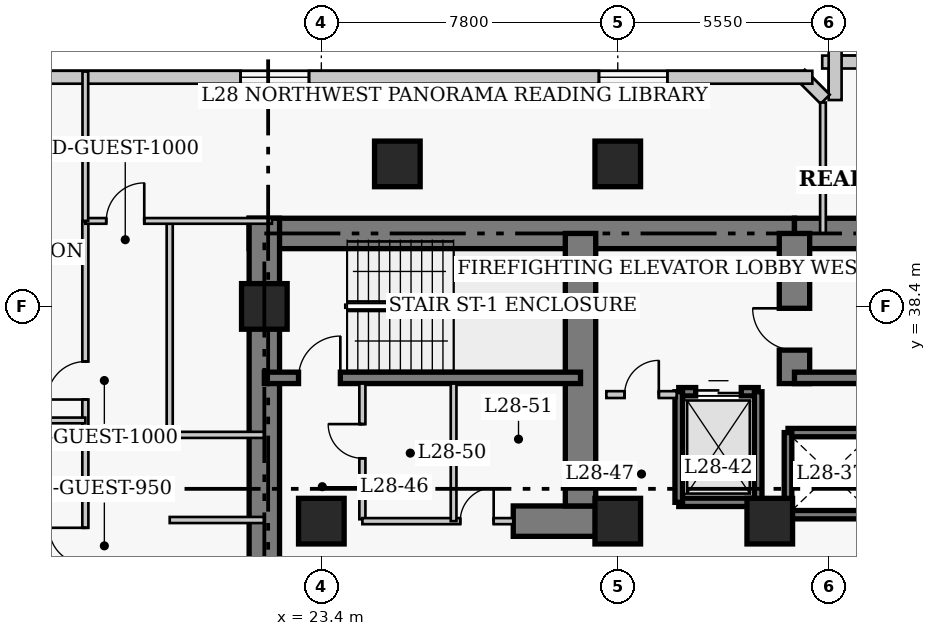
"""IFC4 building model, lengths in metres.
Left out: names, types, materials, properties, quantities, classifications, styles, units other than length and angle.
Written with IfcOpenShell. Run it as: python <this file> out.ifc"""

import sys

from ifc_helpers import new_model, si_unit, direction, frame, frame_2d, origin, origin_2d, place, context, subcontext, project, spatial, rectangle, extrude, element, fill, save


model = new_model("IFC4")
c1 = context("Model", 3, precision=1e-05, world=origin(), true_north=direction((0.0, 1.0)))
c2 = subcontext(c1, "Body", "Model", "MODEL_VIEW")
j1 = project(units=[si_unit("LENGTHUNIT", "METRE"), si_unit("PLANEANGLEUNIT", "RADIAN")], contexts=[c1])
p1 = place(None, origin())
s1 = spatial("IfcSite", under=j1, at=p1, CompositionType="ELEMENT")
p2 = place(p1, origin())
s2 = spatial("IfcBuilding", under=s1, at=p2, CompositionType="ELEMENT")
p3 = place(p2, frame((0.0, 0.0, 114.6)))
s3 = spatial("IfcBuildingStorey", under=s2, at=p3, CompositionType="ELEMENT", Elevation=114.6)
p4 = place(p3, frame((21.5, 40.32, 0.0), z_axis=(0.0, 0.0, 1.0), x_axis=(1.0, 0.0, 0.0)))
e1 = element("IfcWall", 1, at=p4, inside=s3, PredefinedType="SHEAR", context=c2, shape_type="SweptSolid", body=[
    extrude(rectangle(XDim=14.35, YDim=0.8, at=frame_2d((7.175, 0.0))), origin(), (0.0, 0.0, 1.0), 3.8),
])
p5 = place(p3, frame((35.85, 40.32, 0.0), z_axis=(0.0, 0.0, 1.0), x_axis=(1.0, 0.0, 0.0)))
e2 = element("IfcWall", 2, at=p5, inside=s3, PredefinedType="SHEAR", context=c2, shape_type="SweptSolid", body=[
    extrude(rectangle(XDim=12.6, YDim=0.8, at=frame_2d((6.3, 0.0))), origin(), (0.0, 0.0, 1.0), 3.8),
])
p6 = place(p3, frame((21.9, 27.05, 0.0), z_axis=(0.0, 0.0, 1.0), x_axis=(0.0, 1.0, 0.0)))
e3 = element("IfcWall", 3, at=p6, inside=s3, PredefinedType="SHEAR", context=c2, shape_type="SweptSolid", body=[
    extrude(rectangle(XDim=13.67, YDim=0.8, at=frame_2d((6.835, 0.0))), origin(), (0.0, 0.0, 1.0), 3.8),
])
p7 = place(p3, frame((28.45, 32.75, 0.0), z_axis=(0.0, 0.0, 1.0), x_axis=(1.0, 0.0, 0.0)))
e4 = element("IfcWall", 4, at=p7, inside=s3, PredefinedType="SHEAR", context=c2, shape_type="SweptSolid", body=[
    extrude(rectangle(XDim=2.4, YDim=0.8, at=frame_2d((1.2, 0.0))), origin(), (0.0, 0.0, 1.0), 3.8),
])
p8 = place(p3, frame((30.22, 33.15, 0.0), z_axis=(0.0, 0.0, 1.0), x_axis=(0.0, 1.0, 0.0)))
e5 = element("IfcWall", 5, at=p8, inside=s3, PredefinedType="SHEAR", context=c2, shape_type="SweptSolid", body=[
    extrude(rectangle(XDim=7.17, YDim=0.8, at=frame_2d((3.585, 0.0))), origin(), (0.0, 0.0, 1.0), 3.8),
])
p9 = place(p3, frame((35.85, 36.37, 0.0), z_axis=(0.0, 0.0, 1.0), x_axis=(0.0, 1.0, 0.0)))
e6 = element("IfcWall", 6, at=p9, inside=s3, PredefinedType="SHEAR", context=c2, shape_type="SweptSolid", body=[
    extrude(rectangle(XDim=3.95, YDim=0.8, at=frame_2d((1.975, 0.0))), origin(), (0.0, 0.0, 1.0), 3.8),
])
p10 = place(p9, frame((0.88, 0.0, 0.0)))
e7 = element("IfcOpeningElement", 7, at=p10, cuts=e6, PredefinedType="OPENING", context=c2, shape_type="SweptSolid", body=[
    extrude(rectangle(XDim=1.1, YDim=2.15, at=frame_2d((0.55, 1.075))), frame((0.0, 0.41, 0.0), z_axis=(0.0, -1.0, 0.0), x_axis=(1.0, 0.0, 0.0)), (0.0, 0.0, 1.0), 0.82),
])
p11 = place(p3, frame((21.9, 36.52, 0.0), z_axis=(0.0, 0.0, 1.0), x_axis=(1.0, 0.0, 0.0)))
e8 = element("IfcWall", 8, at=p11, inside=s3, PredefinedType="SHEAR", context=c2, shape_type="SweptSolid", body=[
    extrude(rectangle(XDim=8.32, YDim=0.3, at=frame_2d((4.16, 0.0))), origin(), (0.0, 0.0, 1.0), 3.8),
])
p12 = place(p11, frame((0.9, 0.0, 0.0)))
e9 = element("IfcOpeningElement", 9, at=p12, cuts=e8, PredefinedType="OPENING", context=c2, shape_type="SweptSolid", body=[
    extrude(rectangle(XDim=1.1, YDim=2.15, at=frame_2d((0.55, 1.075))), frame((0.0, 0.16, 0.0), z_axis=(0.0, -1.0, 0.0), x_axis=(1.0, 0.0, 0.0)), (0.0, 0.0, 1.0), 0.32),
])
p13 = place(p3, frame((35.85, 36.52, 0.0), z_axis=(0.0, 0.0, 1.0), x_axis=(1.0, 0.0, 0.0)))
e10 = element("IfcWall", 10, at=p13, inside=s3, PredefinedType="SHEAR", context=c2, shape_type="SweptSolid", body=[
    extrude(rectangle(XDim=8.33, YDim=0.3, at=frame_2d((4.165, 0.0))), origin(), (0.0, 0.0, 1.0), 3.8),
])
for number, where, z_axis, x_axis in (
    (11, (21.9, 38.4, 0.0), (0.0, 0.0, 1.0), (1.0, 0.0, 0.0)),
    (12, (23.4, 32.75, 0.0), (0.0, 0.0, 1.0), (1.0, 0.0, 0.0)),
    (13, (31.2, 32.75, 0.0), (0.0, 0.0, 1.0), (1.0, 0.0, 0.0)),
    (14, (35.2, 32.75, 0.0), (0.0, 0.0, 1.0), (1.0, 0.0, 0.0)),
    (15, (25.4, 42.15, 0.0), (0.0, 0.0, 1.0), (1.0, 0.0, 0.0)),
    (16, (31.2, 42.15, 0.0), (0.0, 0.0, 1.0), (1.0, 0.0, 0.0)),
):
    element("IfcColumn", number, at=place(p3, frame(where, z_axis=z_axis, x_axis=x_axis)), inside=s3, PredefinedType="COLUMN", context=c2, shape_type="SweptSolid", body=[
        extrude(rectangle(XDim=1.2, YDim=1.2, at=origin_2d()), origin(), (0.0, 0.0, 1.0), 3.8),
    ])
p14 = place(p3, frame((41.42, 44.83, 0.0), z_axis=(0.0, 0.0, 1.0), x_axis=(-1.0, 0.0, 0.0)))
e17 = element("IfcWall", 17, at=p14, inside=s3, PredefinedType="SOLIDWALL", context=c2, shape_type="SweptSolid", body=[
    extrude(rectangle(XDim=4.84, YDim=0.34, at=frame_2d((2.42, 0.0))), origin(), (0.0, 0.0, 1.0), 3.54),
])
p15 = place(p14, frame((1.52, 0.0, 0.85)))
e18 = element("IfcOpeningElement", 18, at=p15, cuts=e17, PredefinedType="OPENING", context=c2, shape_type="SweptSolid", body=[
    extrude(rectangle(XDim=1.8, YDim=1.8, at=frame_2d((0.9, 0.9))), frame((0.0, 0.18, 0.0), z_axis=(0.0, -1.0, 0.0), x_axis=(1.0, 0.0, 0.0)), (0.0, 0.0, 1.0), 0.36),
])
p16 = place(p3, frame((36.92, 45.17, 0.0), z_axis=(0.0, 0.0, 1.0), x_axis=(0.0, -1.0, 0.0)))
e19 = element("IfcWall", 19, at=p16, inside=s3, PredefinedType="SOLIDWALL", context=c2, shape_type="SweptSolid", body=[
    extrude(rectangle(XDim=1.34, YDim=0.34, at=frame_2d((0.67, 0.0))), origin(), (0.0, 0.0, 1.0), 3.54),
])
p17 = place(p3, frame((36.658, 43.852, 0.0), z_axis=(0.0, 0.0, 1.0), x_axis=(-0.707238225886, 0.706975312048, 0.0)))
e20 = element("IfcWall", 20, at=p17, inside=s3, PredefinedType="SOLIDWALL", context=c2, shape_type="SweptSolid", body=[
    extrude(rectangle(XDim=0.929, YDim=0.34, at=frame_2d((0.464, 0.0))), origin(), (0.0, 0.0, 1.0), 3.54),
])
p18 = place(p3, frame((36.32, 44.43, 0.0), z_axis=(0.0, 0.0, 1.0), x_axis=(-1.0, 0.0, 0.0)))
e21 = element("IfcWall", 21, at=p18, inside=s3, PredefinedType="SOLIDWALL", context=c2, shape_type="SweptSolid", body=[
    extrude(rectangle(XDim=28.29, YDim=0.34, at=frame_2d((14.145, 0.0))), origin(), (0.0, 0.0, 1.0), 3.54),
])
p19 = place(p18, frame((3.815, 0.0, 0.85)))
e22 = element("IfcOpeningElement", 22, at=p19, cuts=e21, PredefinedType="OPENING", context=c2, shape_type="SweptSolid", body=[
    extrude(rectangle(XDim=1.8, YDim=1.8, at=frame_2d((0.9, 0.9))), frame((0.0, 0.18, 0.0), z_axis=(0.0, -1.0, 0.0), x_axis=(1.0, 0.0, 0.0)), (0.0, 0.0, 1.0), 0.36),
])
p20 = place(p18, frame((13.245, 0.0, 0.85)))
e23 = element("IfcOpeningElement", 23, at=p20, cuts=e21, PredefinedType="OPENING", context=c2, shape_type="SweptSolid", body=[
    extrude(rectangle(XDim=1.8, YDim=1.8, at=frame_2d((0.9, 0.9))), frame((0.0, 0.18, 0.0), z_axis=(0.0, -1.0, 0.0), x_axis=(1.0, 0.0, 0.0)), (0.0, 0.0, 1.0), 0.36),
])
p21 = place(p18, frame((22.675, 0.0, 0.85)))
e24 = element("IfcOpeningElement", 24, at=p21, cuts=e21, PredefinedType="OPENING", context=c2, shape_type="SweptSolid", body=[
    extrude(rectangle(XDim=1.8, YDim=1.8, at=frame_2d((0.9, 0.9))), frame((0.0, 0.18, 0.0), z_axis=(0.0, -1.0, 0.0), x_axis=(1.0, 0.0, 0.0)), (0.0, 0.0, 1.0), 0.36),
])
for number, where, z_axis, x_axis in (
    (25, (35.68, 35.08, 0.0), (0.0, 0.0, 1.0), (1.0, 0.0, 0.0)),
    (26, (35.68, 32.92, 0.0), (0.0, 0.0, 1.0), (1.0, 0.0, 0.0)),
):
    element("IfcWall", number, at=place(p3, frame(where, z_axis=z_axis, x_axis=x_axis)), inside=s3, PredefinedType="SHEAR", context=c2, shape_type="SweptSolid", body=[
        extrude(rectangle(XDim=2.32, YDim=0.22, at=frame_2d((1.16, 0.0))), origin(), (0.0, 0.0, 1.0), 3.8),
    ])
p22 = place(p3, frame((35.68, 32.92, 0.0), z_axis=(0.0, 0.0, 1.0), x_axis=(0.0, 1.0, 0.0)))
e27 = element("IfcWall", 27, at=p22, inside=s3, PredefinedType="SHEAR", context=c2, shape_type="SweptSolid", body=[
    extrude(rectangle(XDim=2.16, YDim=0.2, at=frame_2d((1.08, 0.0))), origin(), (0.0, 0.0, 1.0), 3.8),
])
p23 = place(p3, frame((32.805, 36.155, 0.0), z_axis=(0.0, 0.0, 1.0), x_axis=(1.0, 0.0, 0.0)))
e28 = element("IfcWall", 28, at=p23, inside=s3, PredefinedType="SHEAR", context=c2, shape_type="SweptSolid", body=[
    extrude(rectangle(XDim=2.09, YDim=0.22, at=frame_2d((1.045, 0.0))), origin(), (0.0, 0.0, 1.0), 3.8),
])
p24 = place(p23, frame((0.445, 0.0, 0.0)))
e29 = element("IfcOpeningElement", 29, at=p24, cuts=e28, PredefinedType="OPENING", context=c2, shape_type="SweptSolid", body=[
    extrude(rectangle(XDim=1.2, YDim=2.15, at=frame_2d((0.6, 1.075))), frame((0.0, 0.12, 0.0), z_axis=(0.0, -1.0, 0.0), x_axis=(1.0, 0.0, 0.0)), (0.0, 0.0, 1.0), 0.24),
])
p25 = place(p3, frame((32.805, 33.245, 0.0), z_axis=(0.0, 0.0, 1.0), x_axis=(1.0, 0.0, 0.0)))
e30 = element("IfcWall", 30, at=p25, inside=s3, PredefinedType="SHEAR", context=c2, shape_type="SweptSolid", body=[
    extrude(rectangle(XDim=2.09, YDim=0.22, at=frame_2d((1.045, 0.0))), origin(), (0.0, 0.0, 1.0), 3.8),
])
for number, where, z_axis, x_axis in (
    (31, (32.805, 33.245, 0.0), (0.0, 0.0, 1.0), (0.0, 1.0, 0.0)),
    (32, (34.895, 33.245, 0.0), (0.0, 0.0, 1.0), (0.0, 1.0, 0.0)),
):
    element("IfcWall", number, at=place(p3, frame(where, z_axis=z_axis, x_axis=x_axis)), inside=s3, PredefinedType="SHEAR", context=c2, shape_type="SweptSolid", body=[
        extrude(rectangle(XDim=2.91, YDim=0.2, at=frame_2d((1.455, 0.0))), origin(), (0.0, 0.0, 1.0), 3.8),
    ])
p26 = place(p3, frame((30.9, 36.08, 0.0), z_axis=(0.0, 0.0, 1.0), x_axis=(1.0, 0.0, 0.0)))
e33 = element("IfcWall", 33, at=p26, inside=s3, PredefinedType="PARTITIONING", context=c2, shape_type="SweptSolid", body=[
    extrude(rectangle(XDim=1.85, YDim=0.18, at=frame_2d((0.925, 0.0))), origin(), (0.0, 0.0, 1.0), 3.54),
])
p27 = place(p26, frame((0.48, 0.0, 0.0)))
e34 = element("IfcOpeningElement", 34, at=p27, cuts=e33, PredefinedType="OPENING", context=c2, shape_type="SweptSolid", body=[
    extrude(rectangle(XDim=0.9, YDim=2.15, at=frame_2d((0.45, 1.075))), frame((0.0, 0.1, 0.0), z_axis=(0.0, -1.0, 0.0), x_axis=(1.0, 0.0, 0.0)), (0.0, 0.0, 1.0), 0.2),
])
p28 = place(p3, frame((24.48, 32.8, 0.0), z_axis=(0.0, 0.0, 1.0), x_axis=(0.0, 1.0, 0.0)))
e35 = element("IfcWall", 35, at=p28, inside=s3, PredefinedType="PARTITIONING", context=c2, shape_type="SweptSolid", body=[
    extrude(rectangle(XDim=3.57, YDim=0.16, at=frame_2d((1.785, 0.0))), origin(), (0.0, 0.0, 1.0), 3.54),
])
p29 = place(p28, frame((1.604, 0.0, 0.0)))
e36 = element("IfcOpeningElement", 36, at=p29, cuts=e35, PredefinedType="OPENING", context=c2, shape_type="SweptSolid", body=[
    extrude(rectangle(XDim=0.9, YDim=2.1, at=frame_2d((0.45, 1.05))), frame((0.0, 0.09, 0.0), z_axis=(0.0, -1.0, 0.0), x_axis=(1.0, 0.0, 0.0)), (0.0, 0.0, 1.0), 0.18),
])
p30 = place(p3, frame((24.48, 32.75, 0.0), z_axis=(0.0, 0.0, 1.0), x_axis=(1.0, 0.0, 0.0)))
e37 = element("IfcWall", 37, at=p30, inside=s3, PredefinedType="PARTITIONING", context=c2, shape_type="SweptSolid", body=[
    extrude(rectangle(XDim=3.97, YDim=0.16, at=frame_2d((1.985, 0.0))), origin(), (0.0, 0.0, 1.0), 3.54),
])
p31 = place(p30, frame((2.575, 0.0, 0.0)))
e38 = element("IfcOpeningElement", 38, at=p31, cuts=e37, PredefinedType="OPENING", context=c2, shape_type="SweptSolid", body=[
    extrude(rectangle(XDim=0.88, YDim=2.05, at=frame_2d((0.44, 1.025))), frame((0.0, 0.09, 0.0), z_axis=(0.0, -1.0, 0.0), x_axis=(1.0, 0.0, 0.0)), (0.0, 0.0, 1.0), 0.18),
])
p32 = place(p3, frame((26.88, 32.75, 0.0), z_axis=(0.0, 0.0, 1.0), x_axis=(0.0, 1.0, 0.0)))
e39 = element("IfcWall", 39, at=p32, inside=s3, PredefinedType="PARTITIONING", context=c2, shape_type="SweptSolid", body=[
    extrude(rectangle(XDim=3.62, YDim=0.15, at=frame_2d((1.81, 0.0))), origin(), (0.0, 0.0, 1.0), 3.54),
])
p33 = place(p3, frame((17.19, 6.65, 0.0), z_axis=(0.0, 0.0, 1.0), x_axis=(0.0, 1.0, 0.0)))
e40 = element("IfcWall", 40, at=p33, inside=s3, PredefinedType="PARTITIONING", context=c2, shape_type="SweptSolid", body=[
    extrude(rectangle(XDim=34.0, YDim=0.16, at=frame_2d((17.0, 0.0))), origin(), (0.0, 0.0, 1.0), 3.54),
])
p34 = place(p33, frame((1.8, 0.0, 0.0)))
e41 = element("IfcOpeningElement", 41, at=p34, cuts=e40, PredefinedType="OPENING", context=c2, shape_type="SweptSolid", body=[
    extrude(rectangle(XDim=0.95, YDim=2.1, at=frame_2d((0.475, 1.05))), frame((0.0, 0.09, 0.0), z_axis=(0.0, -1.0, 0.0), x_axis=(1.0, 0.0, 0.0)), (0.0, 0.0, 1.0), 0.18),
])
p35 = place(p33, frame((8.475, 0.0, 0.0)))
e42 = element("IfcOpeningElement", 42, at=p35, cuts=e40, PredefinedType="OPENING", context=c2, shape_type="SweptSolid", body=[
    extrude(rectangle(XDim=0.95, YDim=2.1, at=frame_2d((0.475, 1.05))), frame((0.0, 0.09, 0.0), z_axis=(0.0, -1.0, 0.0), x_axis=(1.0, 0.0, 0.0)), (0.0, 0.0, 1.0), 0.18),
])
p36 = place(p33, frame((17.275, 0.0, 0.0)))
e43 = element("IfcOpeningElement", 43, at=p36, cuts=e40, PredefinedType="OPENING", context=c2, shape_type="SweptSolid", body=[
    extrude(rectangle(XDim=0.95, YDim=2.1, at=frame_2d((0.475, 1.05))), frame((0.0, 0.09, 0.0), z_axis=(0.0, -1.0, 0.0), x_axis=(1.0, 0.0, 0.0)), (0.0, 0.0, 1.0), 0.18),
])
p37 = place(p33, frame((24.975, 0.0, 0.0)))
e44 = element("IfcOpeningElement", 44, at=p37, cuts=e40, PredefinedType="OPENING", context=c2, shape_type="SweptSolid", body=[
    extrude(rectangle(XDim=0.95, YDim=2.1, at=frame_2d((0.475, 1.05))), frame((0.0, 0.09, 0.0), z_axis=(0.0, -1.0, 0.0), x_axis=(1.0, 0.0, 0.0)), (0.0, 0.0, 1.0), 0.18),
])
p38 = place(p33, frame((29.3, 0.0, 0.0)))
e45 = element("IfcOpeningElement", 45, at=p38, cuts=e40, PredefinedType="OPENING", context=c2, shape_type="SweptSolid", body=[
    extrude(rectangle(XDim=1.0, YDim=2.15, at=frame_2d((0.5, 1.075))), frame((0.0, 0.09, 0.0), z_axis=(0.0, -1.0, 0.0), x_axis=(1.0, 0.0, 0.0)), (0.0, 0.0, 1.0), 0.18),
])
p39 = place(p3, frame((19.41, 35.02, 0.0), z_axis=(0.0, 0.0, 1.0), x_axis=(0.0, 1.0, 0.0)))
e46 = element("IfcWall", 46, at=p39, inside=s3, PredefinedType="PARTITIONING", context=c2, shape_type="SweptSolid", body=[
    extrude(rectangle(XDim=5.63, YDim=0.16, at=frame_2d((2.815, 0.0))), origin(), (0.0, 0.0, 1.0), 3.54),
])
for number, where, z_axis, x_axis in (
    (47, (19.41, 35.02, 0.0), (0.0, 0.0, 1.0), (1.0, 0.0, 0.0)),
    (48, (19.41, 32.78, 0.0), (0.0, 0.0, 1.0), (1.0, 0.0, 0.0)),
):
    element("IfcWall", number, at=place(p3, frame(where, z_axis=z_axis, x_axis=x_axis)), inside=s3, PredefinedType="PARTITIONING", context=c2, shape_type="SweptSolid", body=[
        extrude(rectangle(XDim=2.49, YDim=0.16, at=frame_2d((1.245, 0.0))), origin(), (0.0, 0.0, 1.0), 3.54),
    ])
p40 = place(p3, frame((17.19, 40.65, 0.0), z_axis=(0.0, 0.0, 1.0), x_axis=(1.0, 0.0, 0.0)))
e49 = element("IfcWall", 49, at=p40, inside=s3, PredefinedType="PARTITIONING", context=c2, shape_type="SweptSolid", body=[
    extrude(rectangle(XDim=4.91, YDim=0.15, at=frame_2d((2.455, 0.0))), origin(), (0.0, 0.0, 1.0), 3.54),
])
p41 = place(p40, frame((0.55, 0.0, 0.0)))
e50 = element("IfcOpeningElement", 50, at=p41, cuts=e49, PredefinedType="OPENING", context=c2, shape_type="SweptSolid", body=[
    extrude(rectangle(XDim=1.0, YDim=2.15, at=frame_2d((0.5, 1.075))), frame((0.0, 0.085, 0.0), z_axis=(0.0, -1.0, 0.0), x_axis=(1.0, 0.0, 0.0)), (0.0, 0.0, 1.0), 0.17),
])
p42 = place(p3, frame((17.19, 40.65, 0.0), z_axis=(0.0, 0.0, 1.0), x_axis=(0.0, 1.0, 0.0)))
e51 = element("IfcWall", 51, at=p42, inside=s3, PredefinedType="PARTITIONING", context=c2, shape_type="SweptSolid", body=[
    extrude(rectangle(XDim=3.93, YDim=0.15, at=frame_2d((1.965, 0.0))), origin(), (0.0, 0.0, 1.0), 3.54),
])
p43 = place(p3, frame((36.6, 40.32, 0.0), z_axis=(0.0, 0.0, 1.0), x_axis=(0.0, 1.0, 0.0)))
e52 = element("IfcWall", 52, at=p43, inside=s3, PredefinedType="PARTITIONING", context=c2, shape_type="SweptSolid", body=[
    extrude(rectangle(XDim=3.445, YDim=0.15, at=frame_2d((1.723, 0.0))), origin(), (0.0, 0.0, 1.0), 3.54),
])
p44 = place(p3, frame((14.45, 35.4, 0.0), z_axis=(0.0, 0.0, 1.0), x_axis=(1.0, 0.0, 0.0)))
e53 = element("IfcWall", 53, at=p44, inside=s3, PredefinedType="PARTITIONING", context=c2, shape_type="SweptSolid", body=[
    extrude(rectangle(XDim=2.74, YDim=0.15, at=frame_2d((1.37, 0.0))), origin(), (0.0, 0.0, 1.0), 3.54),
])
p45 = place(p19, origin())
e54 = element("IfcWindow", 54, at=p45, inside=s3, PartitioningType="SINGLE_PANEL", PredefinedType="WINDOW", context=c2, shape_type="SweptSolid", body=[
    extrude(rectangle(XDim=1.8, YDim=1.8, at=frame_2d((0.9, 0.9))), frame((0.0, 0.03, 0.0), z_axis=(0.0, -1.0, 0.0), x_axis=(1.0, 0.0, 0.0)), (0.0, 0.0, 1.0), 0.06),
])
fill(e22, e54)
p46 = place(p20, origin())
e55 = element("IfcWindow", 55, at=p46, inside=s3, PartitioningType="SINGLE_PANEL", PredefinedType="WINDOW", context=c2, shape_type="SweptSolid", body=[
    extrude(rectangle(XDim=1.8, YDim=1.8, at=frame_2d((0.9, 0.9))), frame((0.0, 0.03, 0.0), z_axis=(0.0, -1.0, 0.0), x_axis=(1.0, 0.0, 0.0)), (0.0, 0.0, 1.0), 0.06),
])
fill(e23, e55)
p47 = place(p24, origin())
e56 = element("IfcDoor", 56, at=p47, inside=s3, OperationType="DOUBLE_DOOR_SLIDING", PredefinedType="DOOR", context=c2, shape_type="SweptSolid", body=[
    extrude(rectangle(XDim=1.2, YDim=2.15, at=frame_2d((0.6, 1.075))), frame((0.0, 0.025, 0.0), z_axis=(0.0, -1.0, 0.0), x_axis=(1.0, 0.0, 0.0)), (0.0, 0.0, 1.0), 0.05),
])
fill(e29, e56)
p48 = place(p27, origin())
e57 = element("IfcDoor", 57, at=p48, inside=s3, OperationType="SINGLE_SWING_RIGHT", PredefinedType="DOOR", context=c2, shape_type="SweptSolid", body=[
    extrude(rectangle(XDim=0.9, YDim=2.15, at=frame_2d((0.45, 1.075))), frame((0.0, 0.025, 0.0), z_axis=(0.0, -1.0, 0.0), x_axis=(1.0, 0.0, 0.0)), (0.0, 0.0, 1.0), 0.05),
])
fill(e34, e57)
p49 = place(p29, origin())
e58 = element("IfcDoor", 58, at=p49, inside=s3, OperationType="SINGLE_SWING_RIGHT", PredefinedType="DOOR", context=c2, shape_type="SweptSolid", body=[
    extrude(rectangle(XDim=0.9, YDim=2.1, at=frame_2d((0.45, 1.05))), frame((0.0, 0.025, 0.0), z_axis=(0.0, -1.0, 0.0), x_axis=(1.0, 0.0, 0.0)), (0.0, 0.0, 1.0), 0.05),
])
fill(e36, e58)
p50 = place(p31, origin())
e59 = element("IfcDoor", 59, at=p50, inside=s3, OperationType="SINGLE_SWING_RIGHT", PredefinedType="DOOR", context=c2, shape_type="SweptSolid", body=[
    extrude(rectangle(XDim=0.88, YDim=2.05, at=frame_2d((0.44, 1.025))), frame((0.0, 0.025, 0.0), z_axis=(0.0, -1.0, 0.0), x_axis=(1.0, 0.0, 0.0)), (0.0, 0.0, 1.0), 0.05),
])
fill(e38, e59)
p51 = place(p41, origin())
e60 = element("IfcDoor", 60, at=p51, inside=s3, OperationType="SINGLE_SWING_RIGHT", PredefinedType="DOOR", context=c2, shape_type="SweptSolid", body=[
    extrude(rectangle(XDim=1.0, YDim=2.15, at=frame_2d((0.5, 1.075))), frame((0.0, 0.025, 0.0), z_axis=(0.0, -1.0, 0.0), x_axis=(1.0, 0.0, 0.0)), (0.0, 0.0, 1.0), 0.05),
])
fill(e50, e60)
p52 = place(p37, origin())
e61 = element("IfcDoor", 61, at=p52, inside=s3, OperationType="SINGLE_SWING_RIGHT", PredefinedType="DOOR", context=c2, shape_type="SweptSolid", body=[
    extrude(rectangle(XDim=0.95, YDim=2.1, at=frame_2d((0.475, 1.05))), frame((0.0, 0.025, 0.0), z_axis=(0.0, -1.0, 0.0), x_axis=(1.0, 0.0, 0.0)), (0.0, 0.0, 1.0), 0.05),
])
fill(e44, e61)
p53 = place(p38, origin())
e62 = element("IfcDoor", 62, at=p53, inside=s3, OperationType="SINGLE_SWING_LEFT", PredefinedType="DOOR", context=c2, shape_type="SweptSolid", body=[
    extrude(rectangle(XDim=1.0, YDim=2.15, at=frame_2d((0.5, 1.075))), frame((0.0, 0.025, 0.0), z_axis=(0.0, -1.0, 0.0), x_axis=(1.0, 0.0, 0.0)), (0.0, 0.0, 1.0), 0.05),
])
fill(e45, e62)
p54 = place(p12, origin())
e63 = element("IfcDoor", 63, at=p54, inside=s3, OperationType="SINGLE_SWING_RIGHT", PredefinedType="DOOR", context=c2, shape_type="SweptSolid", body=[
    extrude(rectangle(XDim=1.1, YDim=2.15, at=frame_2d((0.55, 1.075))), frame((0.0, 0.025, 0.0), z_axis=(0.0, -1.0, 0.0), x_axis=(1.0, 0.0, 0.0)), (0.0, 0.0, 1.0), 0.05),
])
fill(e9, e63)
p55 = place(p10, origin())
e64 = element("IfcDoor", 64, at=p55, inside=s3, OperationType="SINGLE_SWING_RIGHT", PredefinedType="DOOR", context=c2, shape_type="SweptSolid", body=[
    extrude(rectangle(XDim=1.1, YDim=2.15, at=frame_2d((0.55, 1.075))), frame((0.0, 0.025, 0.0), z_axis=(0.0, -1.0, 0.0), x_axis=(1.0, 0.0, 0.0)), (0.0, 0.0, 1.0), 0.05),
])
fill(e7, e64)
save(model, sys.argv[1])
